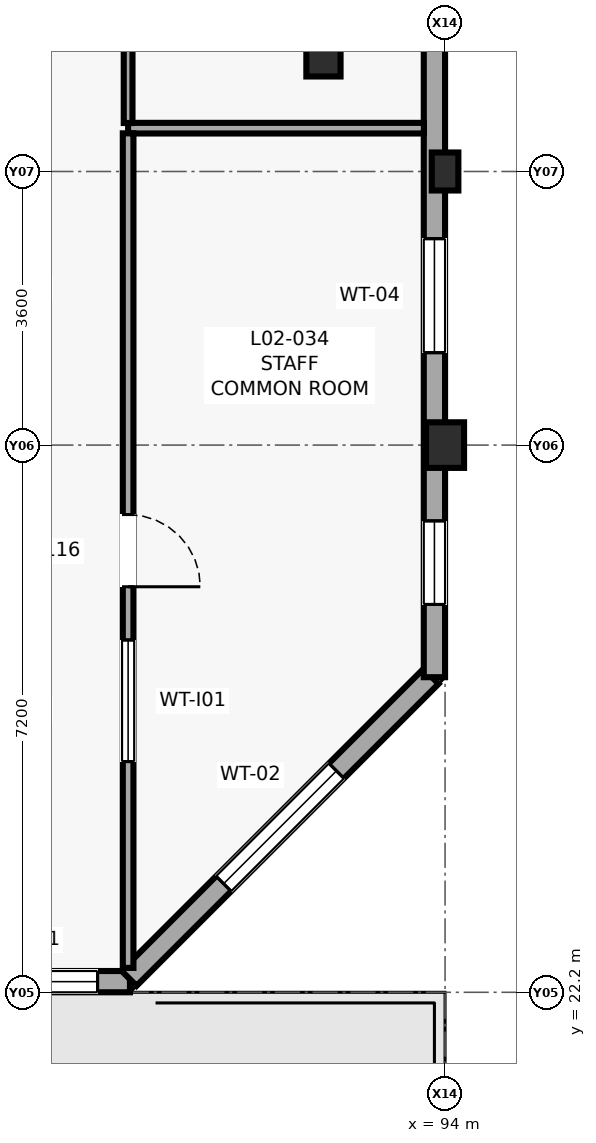
"""IFC4 building model, lengths in metres.
Left out: names, types, materials, properties, quantities, classifications, styles, units other than length and angle.
Written with IfcOpenShell. Run it as: python <this file> out.ifc"""

import sys

from ifc_helpers import new_model, si_unit, direction, frame, frame_2d, origin, origin_2d, place, context, subcontext, project, spatial, rectangle, extrude, element, fill, save


model = new_model("IFC4")
c1 = context("Model", 3, precision=1e-05, world=origin(), true_north=direction((0.0, 1.0)))
c2 = subcontext(c1, "Body", "Model", "MODEL_VIEW")
j1 = project(units=[si_unit("LENGTHUNIT", "METRE"), si_unit("PLANEANGLEUNIT", "RADIAN")], contexts=[c1])
p1 = place(None, origin())
s1 = spatial("IfcSite", under=j1, at=p1, CompositionType="ELEMENT")
p2 = place(p1, origin())
s2 = spatial("IfcBuilding", under=s1, at=p2, CompositionType="ELEMENT")
p3 = place(p2, frame((0.0, 0.0, 8.2)))
s3 = spatial("IfcBuildingStorey", under=s2, at=p3, CompositionType="ELEMENT", Elevation=8.2)
p4 = place(p3, frame((92.4, 34.6, 0.0), z_axis=(0.0, 0.0, 1.0), x_axis=(1.0, 0.0, 0.0)))
e1 = element("IfcColumn", 1, at=p4, inside=s3, PredefinedType="COLUMN", context=c2, shape_type="SweptSolid", body=[
    extrude(rectangle(XDim=0.45, YDim=0.7, at=origin_2d()), origin(), (0.0, 0.0, 1.0), 4.0),
])
p5 = place(p3, frame((94.0, 29.4, 0.0), z_axis=(0.0, 0.0, 1.0), x_axis=(1.0, 0.0, 0.0)))
e2 = element("IfcColumn", 2, at=p5, inside=s3, PredefinedType="PILASTER", context=c2, shape_type="SweptSolid", body=[
    extrude(rectangle(XDim=0.5, YDim=0.6, at=origin_2d()), origin(), (0.0, 0.0, 1.0), 4.0),
])
p6 = place(p3, frame((94.0, 33.0, 0.0), z_axis=(0.0, 0.0, 1.0), x_axis=(1.0, 0.0, 0.0)))
e3 = element("IfcColumn", 3, at=p6, inside=s3, PredefinedType="PILASTER", context=c2, shape_type="SweptSolid", body=[
    extrude(rectangle(XDim=0.35, YDim=0.5, at=origin_2d()), origin(), (0.0, 0.0, 1.0), 4.0),
])
p7 = place(p3, frame((79.2, 22.34, 0.0), z_axis=(0.0, 0.0, 1.0), x_axis=(1.0, 0.0, 0.0)))
e4 = element("IfcWall", 4, at=p7, inside=s3, PredefinedType="SOLIDWALL", context=c2, shape_type="SweptSolid", body=[
    extrude(rectangle(XDim=10.654, YDim=0.28, at=frame_2d((5.327, 0.0))), origin(), (0.0, 0.0, 1.0), 3.78),
])
p8 = place(p7, frame((4.3, 0.0, 0.0)))
e5 = element("IfcOpeningElement", 5, at=p8, cuts=e4, PredefinedType="OPENING", context=c2, shape_type="SweptSolid", body=[
    extrude(rectangle(XDim=1.0, YDim=2.1, at=frame_2d((0.5, 1.05))), frame((0.0, 0.15, 0.0), z_axis=(0.0, -1.0, 0.0), x_axis=(1.0, 0.0, 0.0)), (0.0, 0.0, 1.0), 0.3),
])
p9 = place(p7, frame((0.901, 0.0, 0.75)))
e6 = element("IfcOpeningElement", 6, at=p9, cuts=e4, PredefinedType="OPENING", context=c2, shape_type="SweptSolid", body=[
    extrude(rectangle(XDim=1.75, YDim=2.05, at=frame_2d((0.875, 1.025))), frame((0.0, 0.15, 0.0), z_axis=(0.0, -1.0, 0.0), x_axis=(1.0, 0.0, 0.0)), (0.0, 0.0, 1.0), 0.3),
])
p10 = place(p7, frame((5.727, 0.0, 1.05)))
e7 = element("IfcOpeningElement", 7, at=p10, cuts=e4, PredefinedType="OPENING", context=c2, shape_type="SweptSolid", body=[
    extrude(rectangle(XDim=0.9, YDim=1.5, at=frame_2d((0.45, 0.75))), frame((0.0, 0.15, 0.0), z_axis=(0.0, -1.0, 0.0), x_axis=(1.0, 0.0, 0.0)), (0.0, 0.0, 1.0), 0.3),
])
p11 = place(p7, frame((8.428, 0.0, 0.85)))
e8 = element("IfcOpeningElement", 8, at=p11, cuts=e4, PredefinedType="OPENING", context=c2, shape_type="SweptSolid", body=[
    extrude(rectangle(XDim=1.8, YDim=1.8, at=frame_2d((0.9, 0.9))), frame((0.0, 0.15, 0.0), z_axis=(0.0, -1.0, 0.0), x_axis=(1.0, 0.0, 0.0)), (0.0, 0.0, 1.0), 0.3),
])
p12 = place(p3, frame((89.842, 22.384, 0.0), z_axis=(0.0, 0.0, 1.0), x_axis=(0.707106781187, 0.707106781187, 0.0)))
e9 = element("IfcWall", 9, at=p12, inside=s3, PredefinedType="SOLIDWALL", context=c2, shape_type="SweptSolid", body=[
    extrude(rectangle(XDim=5.62, YDim=0.28, at=frame_2d((2.81, 0.0))), origin(), (0.0, 0.0, 1.0), 3.78),
])
p13 = place(p12, frame((1.76, 0.0, 0.85)))
e10 = element("IfcOpeningElement", 10, at=p13, cuts=e9, PredefinedType="OPENING", context=c2, shape_type="SweptSolid", body=[
    extrude(rectangle(XDim=2.1, YDim=1.8, at=frame_2d((1.05, 0.9))), frame((0.0, 0.15, 0.0), z_axis=(0.0, -1.0, 0.0), x_axis=(1.0, 0.0, 0.0)), (0.0, 0.0, 1.0), 0.3),
])
p14 = place(p3, frame((93.86, 26.346, 0.0), z_axis=(0.0, 0.0, 1.0), x_axis=(0.0, 1.0, 0.0)))
e11 = element("IfcWall", 11, at=p14, inside=s3, PredefinedType="SOLIDWALL", context=c2, shape_type="SweptSolid", body=[
    extrude(rectangle(XDim=15.654, YDim=0.28, at=frame_2d((7.827, 0.0))), origin(), (0.0, 0.0, 1.0), 3.225),
])
p15 = place(p14, frame((0.957, 0.0, 0.75)))
e12 = element("IfcOpeningElement", 12, at=p15, cuts=e11, PredefinedType="OPENING", context=c2, shape_type="SweptSolid", body=[
    extrude(rectangle(XDim=1.1, YDim=2.1, at=frame_2d((0.55, 1.05))), frame((0.0, 0.15, 0.0), z_axis=(0.0, -1.0, 0.0), x_axis=(1.0, 0.0, 0.0)), (0.0, 0.0, 1.0), 0.3),
])
p16 = place(p14, frame((4.27, 0.0, 0.85)))
e13 = element("IfcOpeningElement", 13, at=p16, cuts=e11, PredefinedType="OPENING", context=c2, shape_type="SweptSolid", body=[
    extrude(rectangle(XDim=1.5, YDim=1.65, at=frame_2d((0.75, 0.825))), frame((0.0, 0.15, 0.0), z_axis=(0.0, -1.0, 0.0), x_axis=(1.0, 0.0, 0.0)), (0.0, 0.0, 1.0), 0.3),
])
p17 = place(p14, frame((8.334, 0.0, 0.85)))
e14 = element("IfcOpeningElement", 14, at=p17, cuts=e11, PredefinedType="OPENING", context=c2, shape_type="SweptSolid", body=[
    extrude(rectangle(XDim=1.2, YDim=1.65, at=frame_2d((0.6, 0.825))), frame((0.0, 0.15, 0.0), z_axis=(0.0, -1.0, 0.0), x_axis=(1.0, 0.0, 0.0)), (0.0, 0.0, 1.0), 0.3),
])
p18 = place(p14, frame((13.247, 0.0, 1.05)))
e15 = element("IfcOpeningElement", 15, at=p18, cuts=e11, PredefinedType="OPENING", context=c2, shape_type="SweptSolid", body=[
    extrude(rectangle(XDim=0.9, YDim=1.5, at=frame_2d((0.45, 0.75))), frame((0.0, 0.15, 0.0), z_axis=(0.0, -1.0, 0.0), x_axis=(1.0, 0.0, 0.0)), (0.0, 0.0, 1.0), 0.3),
])
p19 = place(p3, frame((93.722, 33.57, 0.0), z_axis=(0.0, 0.0, 1.0), x_axis=(-1.0, 0.0, 0.0)))
e16 = element("IfcWall", 16, at=p19, inside=s3, PredefinedType="PARTITIONING", context=c2, shape_type="SweptSolid", body=[
    extrude(rectangle(XDim=3.892, YDim=0.14, at=frame_2d((1.946, 0.0))), origin(), (0.0, 0.0, 1.0), 3.76),
])
p20 = place(p3, frame((89.83, 33.502, 0.0), z_axis=(0.0, 0.0, 1.0), x_axis=(0.0, -1.0, 0.0)))
e17 = element("IfcWall", 17, at=p20, inside=s3, PredefinedType="PARTITIONING", context=c2, shape_type="SweptSolid", body=[
    extrude(rectangle(XDim=10.981, YDim=0.14, at=frame_2d((5.49, 0.0))), origin(), (0.0, 0.0, 1.0), 3.76),
])
p21 = place(p20, frame((5.016, 0.0, 0.0)))
e18 = element("IfcOpeningElement", 18, at=p21, cuts=e17, PredefinedType="OPENING", context=c2, shape_type="SweptSolid", body=[
    extrude(rectangle(XDim=0.95, YDim=2.05, at=frame_2d((0.475, 1.025))), frame((0.0, 0.08, 0.0), z_axis=(0.0, -1.0, 0.0), x_axis=(1.0, 0.0, 0.0)), (0.0, 0.0, 1.0), 0.16),
])
p22 = place(p20, frame((6.666, 0.0, 1.05)))
e19 = element("IfcOpeningElement", 19, at=p22, cuts=e17, PredefinedType="OPENING", context=c2, shape_type="SweptSolid", body=[
    extrude(rectangle(XDim=1.6, YDim=1.1, at=frame_2d((0.8, 0.55))), frame((0.0, 0.08, 0.0), z_axis=(0.0, -1.0, 0.0), x_axis=(1.0, 0.0, 0.0)), (0.0, 0.0, 1.0), 0.16),
])
p23 = place(p3, frame((89.83, 41.912, 0.0), z_axis=(0.0, 0.0, 1.0), x_axis=(0.0, -1.0, 0.0)))
e20 = element("IfcWall", 20, at=p23, inside=s3, PredefinedType="PARTITIONING", context=c2, shape_type="SweptSolid", body=[
    extrude(rectangle(XDim=8.274, YDim=0.115, at=frame_2d((4.137, 0.0))), origin(), (0.0, 0.0, 1.0), 3.775),
])
p24 = place(p23, frame((3.662, 0.0, 0.0)))
e21 = element("IfcOpeningElement", 21, at=p24, cuts=e20, PredefinedType="OPENING", context=c2, shape_type="SweptSolid", body=[
    extrude(rectangle(XDim=0.95, YDim=2.05, at=frame_2d((0.475, 1.025))), frame((0.0, 0.067, 0.0), z_axis=(0.0, -1.0, 0.0), x_axis=(1.0, 0.0, 0.0)), (0.0, 0.0, 1.0), 0.135),
])
p25 = place(p23, frame((5.312, 0.0, 1.05)))
e22 = element("IfcOpeningElement", 22, at=p25, cuts=e20, PredefinedType="OPENING", context=c2, shape_type="SweptSolid", body=[
    extrude(rectangle(XDim=1.8, YDim=1.2, at=frame_2d((0.9, 0.6))), frame((0.0, 0.067, 0.0), z_axis=(0.0, -1.0, 0.0), x_axis=(1.0, 0.0, 0.0)), (0.0, 0.0, 1.0), 0.135),
])
p26 = place(p11, origin())
e23 = element("IfcWindow", 23, at=p26, inside=s3, PartitioningType="SINGLE_PANEL", PredefinedType="WINDOW", context=c2, shape_type="SweptSolid", body=[
    extrude(rectangle(XDim=1.8, YDim=1.8, at=frame_2d((0.9, 0.9))), frame((0.0, 0.03, 0.0), z_axis=(0.0, -1.0, 0.0), x_axis=(1.0, 0.0, 0.0)), (0.0, 0.0, 1.0), 0.06),
])
fill(e8, e23)
p27 = place(p13, origin())
e24 = element("IfcWindow", 24, at=p27, inside=s3, PartitioningType="SINGLE_PANEL", PredefinedType="WINDOW", context=c2, shape_type="SweptSolid", body=[
    extrude(rectangle(XDim=2.1, YDim=1.8, at=frame_2d((1.05, 0.9))), frame((0.0, 0.03, 0.0), z_axis=(0.0, -1.0, 0.0), x_axis=(1.0, 0.0, 0.0)), (0.0, 0.0, 1.0), 0.06),
])
fill(e10, e24)
p28 = place(p15, origin())
e25 = element("IfcWindow", 25, at=p28, inside=s3, PartitioningType="SINGLE_PANEL", PredefinedType="WINDOW", context=c2, shape_type="SweptSolid", body=[
    extrude(rectangle(XDim=1.1, YDim=2.1, at=frame_2d((0.55, 1.05))), frame((0.0, 0.03, 0.0), z_axis=(0.0, -1.0, 0.0), x_axis=(1.0, 0.0, 0.0)), (0.0, 0.0, 1.0), 0.06),
])
fill(e12, e25)
p29 = place(p16, origin())
e26 = element("IfcWindow", 26, at=p29, inside=s3, PartitioningType="SINGLE_PANEL", PredefinedType="WINDOW", context=c2, shape_type="SweptSolid", body=[
    extrude(rectangle(XDim=1.5, YDim=1.65, at=frame_2d((0.75, 0.825))), frame((0.0, 0.03, 0.0), z_axis=(0.0, -1.0, 0.0), x_axis=(1.0, 0.0, 0.0)), (0.0, 0.0, 1.0), 0.06),
])
fill(e13, e26)
p30 = place(p21, origin())
e27 = element("IfcDoor", 27, at=p30, inside=s3, OperationType="SINGLE_SWING_RIGHT", PredefinedType="DOOR", context=c2, shape_type="SweptSolid", body=[
    extrude(rectangle(XDim=0.95, YDim=2.05, at=frame_2d((0.475, 1.025))), frame((0.0, 0.025, 0.0), z_axis=(0.0, -1.0, 0.0), x_axis=(1.0, 0.0, 0.0)), (0.0, 0.0, 1.0), 0.05),
])
fill(e18, e27)
p31 = place(p22, origin())
e28 = element("IfcWindow", 28, at=p31, inside=s3, PartitioningType="SINGLE_PANEL", PredefinedType="WINDOW", context=c2, shape_type="SweptSolid", body=[
    extrude(rectangle(XDim=1.6, YDim=1.1, at=frame_2d((0.8, 0.55))), frame((0.0, 0.03, 0.0), z_axis=(0.0, -1.0, 0.0), x_axis=(1.0, 0.0, 0.0)), (0.0, 0.0, 1.0), 0.06),
])
fill(e19, e28)
save(model, sys.argv[1])
